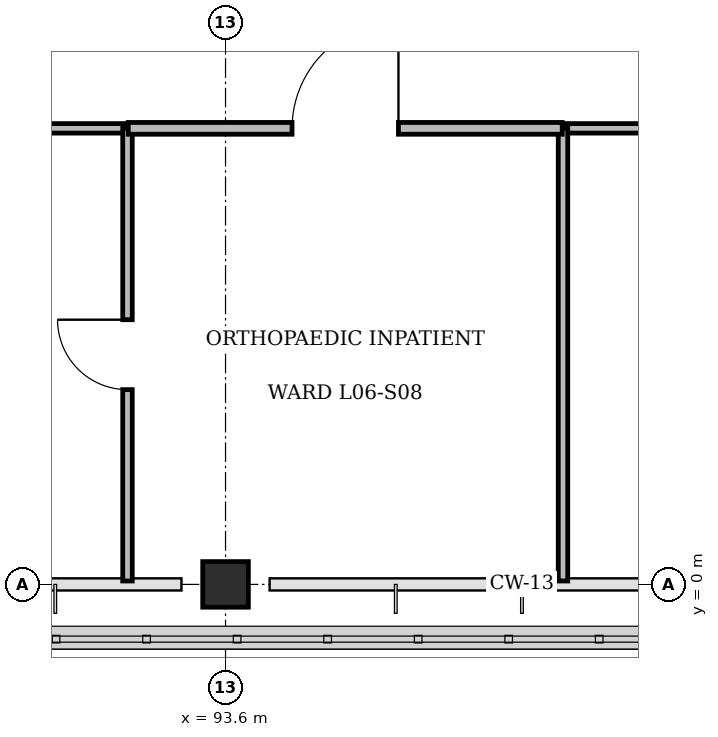
"""IFC4 building model, lengths in metres.
Left out: names, types, materials, properties, quantities, classifications, styles, units other than length and angle.
Written with IfcOpenShell. Run it as: python <this file> out.ifc"""

import sys

from ifc_helpers import new_model, si_unit, direction, frame, frame_2d, origin, origin_2d, place, context, subcontext, project, spatial, rectangle, extrude, element, fill, save


model = new_model("IFC4")
c1 = context("Model", 3, precision=1e-05, world=origin(), true_north=direction((0.0, 1.0)))
c2 = subcontext(c1, "Body", "Model", "MODEL_VIEW")
j1 = project(units=[si_unit("LENGTHUNIT", "METRE"), si_unit("PLANEANGLEUNIT", "RADIAN")], contexts=[c1])
p1 = place(None, origin())
s1 = spatial("IfcSite", under=j1, at=p1, CompositionType="ELEMENT")
p2 = place(p1, origin())
s2 = spatial("IfcBuilding", under=s1, at=p2, CompositionType="ELEMENT")
p3 = place(p2, frame((0.0, 0.0, 26.4)))
s3 = spatial("IfcBuildingStorey", under=s2, at=p3, CompositionType="ELEMENT", Elevation=26.4)
p4 = place(p3, frame((93.6, 0.0, 0.0), z_axis=(0.0, 0.0, 1.0), x_axis=(1.0, 0.0, 0.0)))
e1 = element("IfcColumn", 1, at=p4, inside=s3, PredefinedType="COLUMN", context=c2, shape_type="SweptSolid", body=[
    extrude(rectangle(XDim=0.6, YDim=0.6, at=origin_2d()), origin(), (0.0, 0.0, 1.0), 4.2),
])
p5 = place(p3, frame((90.06, 6.0, 0.0), z_axis=(0.0, 0.0, 1.0), x_axis=(1.0, 0.0, 0.0)))
e2 = element("IfcWall", 2, at=p5, inside=s3, PredefinedType="PARTITIONING", context=c2, shape_type="SweptSolid", body=[
    extrude(rectangle(XDim=2.25, YDim=0.125, at=frame_2d((1.125, 0.0))), origin(), (0.0, 0.0, 1.0), 3.9),
])
p6 = place(p3, frame((92.31, 0.045, 0.0), z_axis=(0.0, 0.0, 1.0), x_axis=(0.0, 1.0, 0.0)))
e3 = element("IfcWall", 3, at=p6, inside=s3, PredefinedType="PARTITIONING", context=c2, shape_type="SweptSolid", body=[
    extrude(rectangle(XDim=5.955, YDim=0.125, at=frame_2d((2.978, 0.0))), origin(), (0.0, 0.0, 1.0), 3.9),
])
p7 = place(p6, frame((2.518, 0.0, 0.0)))
e4 = element("IfcOpeningElement", 4, at=p7, cuts=e3, PredefinedType="OPENING", context=c2, shape_type="SweptSolid", body=[
    extrude(rectangle(XDim=0.92, YDim=2.1, at=frame_2d((0.46, 1.05))), frame((0.0, 0.073, 0.0), z_axis=(0.0, -1.0, 0.0), x_axis=(1.0, 0.0, 0.0)), (0.0, 0.0, 1.0), 0.145),
])
p8 = place(p3, frame((98.04, 6.0, 0.0), z_axis=(0.0, 0.0, 1.0), x_axis=(1.0, 0.0, 0.0)))
e5 = element("IfcWall", 5, at=p8, inside=s3, PredefinedType="PARTITIONING", context=c2, shape_type="SweptSolid", body=[
    extrude(rectangle(XDim=2.25, YDim=0.125, at=frame_2d((1.125, 0.0))), origin(), (0.0, 0.0, 1.0), 3.9),
])
p9 = place(p3, frame((98.04, 0.045, 0.0), z_axis=(0.0, 0.0, 1.0), x_axis=(0.0, 1.0, 0.0)))
e6 = element("IfcWall", 6, at=p9, inside=s3, PredefinedType="PARTITIONING", context=c2, shape_type="SweptSolid", body=[
    extrude(rectangle(XDim=5.955, YDim=0.125, at=frame_2d((2.978, 0.0))), origin(), (0.0, 0.0, 1.0), 3.9),
])
p10 = place(p3, frame((92.32, 6.0, 0.0), z_axis=(0.0, 0.0, 1.0), x_axis=(1.0, 0.0, 0.0)))
e7 = element("IfcWall", 7, at=p10, inside=s3, PredefinedType="PARTITIONING", context=c2, shape_type="SweptSolid", body=[
    extrude(rectangle(XDim=5.71, YDim=0.155, at=frame_2d((2.855, 0.0))), origin(), (0.0, 0.0, 1.0), 3.9),
])
p11 = place(p10, frame((2.155, 0.0, 0.0)))
e8 = element("IfcOpeningElement", 8, at=p11, cuts=e7, PredefinedType="OPENING", context=c2, shape_type="SweptSolid", body=[
    extrude(rectangle(XDim=1.4, YDim=2.2, at=frame_2d((0.7, 1.1))), frame((0.0, 0.087, 0.0), z_axis=(0.0, -1.0, 0.0), x_axis=(1.0, 0.0, 0.0)), (0.0, 0.0, 1.0), 0.175),
])
p12 = place(p7, origin())
e9 = element("IfcDoor", 9, at=p12, inside=s3, OperationType="SINGLE_SWING_RIGHT", PredefinedType="DOOR", context=c2, shape_type="SweptSolid", body=[
    extrude(rectangle(XDim=0.92, YDim=2.1, at=frame_2d((0.46, 1.05))), frame((0.0, 0.025, 0.0), z_axis=(0.0, -1.0, 0.0), x_axis=(1.0, 0.0, 0.0)), (0.0, 0.0, 1.0), 0.05),
])
fill(e4, e9)
p13 = place(p11, origin())
e10 = element("IfcDoor", 10, at=p13, inside=s3, OperationType="SINGLE_SWING_RIGHT", PredefinedType="DOOR", context=c2, shape_type="SweptSolid", body=[
    extrude(rectangle(XDim=1.4, YDim=2.2, at=frame_2d((0.7, 1.1))), frame((0.0, 0.025, 0.0), z_axis=(0.0, -1.0, 0.0), x_axis=(1.0, 0.0, 0.0)), (0.0, 0.0, 1.0), 0.05),
])
fill(e8, e10)
save(model, sys.argv[1])
